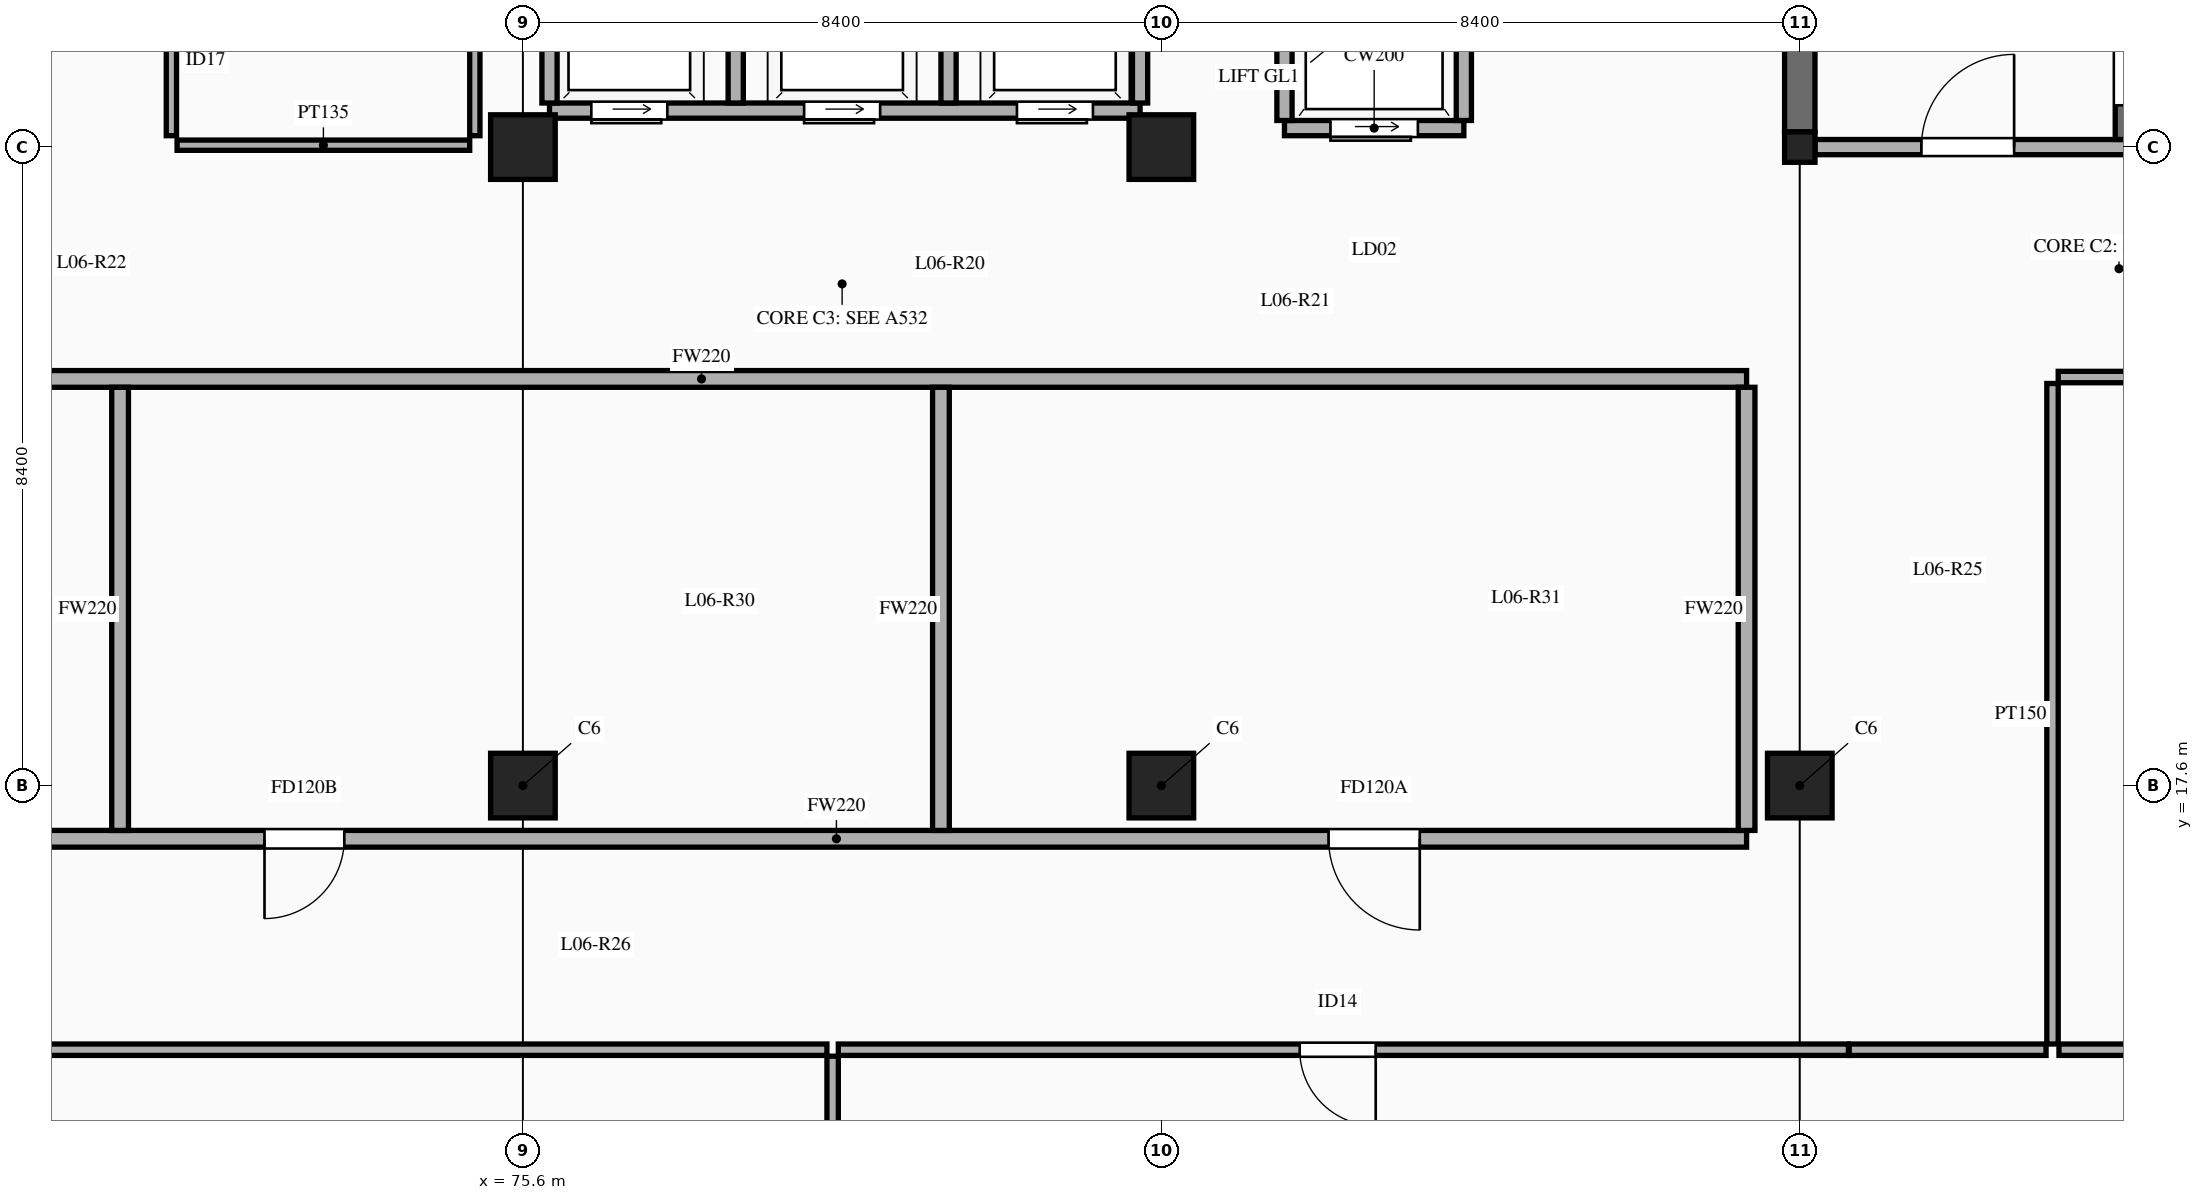
"""IFC4 building model, lengths in metres.
Left out: names, types, materials, properties, quantities, classifications, styles, units other than length and angle.
Written with IfcOpenShell. Run it as: python <this file> out.ifc"""

import sys

from ifc_helpers import new_model, si_unit, direction, frame, frame_2d, origin, origin_2d, place, context, subcontext, project, spatial, rectangle, extrude, element, fill, save


model = new_model("IFC4")
c1 = context("Model", 3, precision=1e-05, world=origin(), true_north=direction((0.0, 1.0)))
c2 = subcontext(c1, "Body", "Model", "MODEL_VIEW")
j1 = project(units=[si_unit("LENGTHUNIT", "METRE"), si_unit("PLANEANGLEUNIT", "RADIAN")], contexts=[c1])
p1 = place(None, origin())
s1 = spatial("IfcSite", under=j1, at=p1, CompositionType="ELEMENT")
p2 = place(p1, origin())
s2 = spatial("IfcBuilding", under=s1, at=p2, CompositionType="ELEMENT")
p3 = place(p2, frame((0.0, 0.0, 28.5)))
s3 = spatial("IfcBuildingStorey", under=s2, at=p3, CompositionType="ELEMENT", Elevation=28.5)
for number, where, z_axis, x_axis in (
    (1, (75.6, 17.6, 0.0), (0.0, 0.0, 1.0), (1.0, 0.0, 0.0)),
    (2, (75.6, 26.0, 0.0), (0.0, 0.0, 1.0), (1.0, 0.0, 0.0)),
    (3, (84.0, 17.6, 0.0), (0.0, 0.0, 1.0), (1.0, 0.0, 0.0)),
    (4, (84.0, 26.0, 0.0), (0.0, 0.0, 1.0), (1.0, 0.0, 0.0)),
    (5, (92.4, 17.6, 0.0), (0.0, 0.0, 1.0), (1.0, 0.0, 0.0)),
):
    element("IfcColumn", number, at=place(p3, frame(where, z_axis=z_axis, x_axis=x_axis)), inside=s3, PredefinedType="COLUMN", context=c2, shape_type="SweptSolid", body=[
        extrude(rectangle(XDim=0.85, YDim=0.85, at=origin_2d()), origin(), (0.0, 0.0, 1.0), 4.5),
    ])
p4 = place(p3, frame((92.4, 26.0, 0.0), z_axis=(0.0, 0.0, 1.0), x_axis=(1.0, 0.0, 0.0)))
e6 = element("IfcColumn", 6, at=p4, inside=s3, PredefinedType="COLUMN", context=c2, shape_type="SweptSolid", body=[
    extrude(rectangle(XDim=0.4, YDim=0.4, at=origin_2d()), origin(), (0.0, 0.0, 1.0), 4.5),
])
p5 = place(p3, frame((92.4, 26.2, 0.0), z_axis=(0.0, 0.0, 1.0), x_axis=(0.0, 1.0, 0.0)))
e7 = element("IfcWall", 7, at=p5, inside=s3, PredefinedType="SHEAR", context=c2, shape_type="SweptSolid", body=[
    extrude(rectangle(XDim=8.0, YDim=0.4, at=frame_2d((4.0, 0.0))), origin(), (0.0, 0.0, 1.0), 4.5),
])
p6 = place(p3, frame((92.6, 26.0, 0.0), z_axis=(0.0, 0.0, 1.0), x_axis=(1.0, 0.0, 0.0)))
e8 = element("IfcWall", 8, at=p6, inside=s3, PredefinedType="SOLIDWALL", context=c2, shape_type="SweptSolid", body=[
    extrude(rectangle(XDim=8.0, YDim=0.2, at=frame_2d((4.0, 0.0))), origin(), (0.0, 0.0, 1.0), 3.78),
])
p7 = place(p6, frame((1.4, 0.0, 0.0)))
e9 = element("IfcOpeningElement", 9, at=p7, cuts=e8, PredefinedType="OPENING", context=c2, shape_type="SweptSolid", body=[
    extrude(rectangle(XDim=1.22, YDim=2.15, at=frame_2d((0.61, 1.075))), frame((0.0, 0.11, 0.0), z_axis=(0.0, -1.0, 0.0), x_axis=(1.0, 0.0, 0.0)), (0.0, 0.0, 1.0), 0.22),
])
p8 = place(p6, frame((5.3, 0.0, 0.0)))
e10 = element("IfcOpeningElement", 10, at=p8, cuts=e8, PredefinedType="OPENING", context=c2, shape_type="SweptSolid", body=[
    extrude(rectangle(XDim=1.15, YDim=2.15, at=frame_2d((0.575, 1.075))), frame((0.0, 0.11, 0.0), z_axis=(0.0, -1.0, 0.0), x_axis=(1.0, 0.0, 0.0)), (0.0, 0.0, 1.0), 0.22),
])
p9 = place(p3, frame((96.65, 26.1, 0.0), z_axis=(0.0, 0.0, 1.0), x_axis=(0.0, 1.0, 0.0)))
e11 = element("IfcWall", 11, at=p9, inside=s3, PredefinedType="SOLIDWALL", context=c2, shape_type="SweptSolid", body=[
    extrude(rectangle(XDim=8.1, YDim=0.2, at=frame_2d((4.05, 0.0))), origin(), (0.0, 0.0, 1.0), 4.3),
])
p10 = place(p9, frame((0.45, 0.0, 0.0)))
e12 = element("IfcOpeningElement", 12, at=p10, cuts=e11, PredefinedType="OPENING", context=c2, shape_type="SweptSolid", body=[
    extrude(rectangle(XDim=1.12, YDim=2.15, at=frame_2d((0.56, 1.075))), frame((0.0, 0.11, 0.0), z_axis=(0.0, -1.0, 0.0), x_axis=(1.0, 0.0, 0.0)), (0.0, 0.0, 1.0), 0.22),
])
p11 = place(p3, frame((75.95, 26.48, 0.0), z_axis=(0.0, 0.0, 1.0), x_axis=(1.0, 0.0, 0.0)))
e13 = element("IfcWall", 13, at=p11, inside=s3, PredefinedType="SOLIDWALL", context=c2, shape_type="SweptSolid", body=[
    extrude(rectangle(XDim=7.77, YDim=0.2, at=frame_2d((3.885, 0.0))), origin(), (0.0, 0.0, 1.0), 4.3),
])
p12 = place(p11, frame((0.55, 0.0, 0.0)))
e14 = element("IfcOpeningElement", 14, at=p12, cuts=e13, PredefinedType="OPENING", context=c2, shape_type="SweptSolid", body=[
    extrude(rectangle(XDim=1.0, YDim=2.15, at=frame_2d((0.5, 1.075))), frame((0.0, 0.11, 0.0), z_axis=(0.0, -1.0, 0.0), x_axis=(1.0, 0.0, 0.0)), (0.0, 0.0, 1.0), 0.22),
])
p13 = place(p11, frame((3.35, 0.0, 0.0)))
e15 = element("IfcOpeningElement", 15, at=p13, cuts=e13, PredefinedType="OPENING", context=c2, shape_type="SweptSolid", body=[
    extrude(rectangle(XDim=1.0, YDim=2.15, at=frame_2d((0.5, 1.075))), frame((0.0, 0.11, 0.0), z_axis=(0.0, -1.0, 0.0), x_axis=(1.0, 0.0, 0.0)), (0.0, 0.0, 1.0), 0.22),
])
p14 = place(p11, frame((6.15, 0.0, 0.0)))
e16 = element("IfcOpeningElement", 16, at=p14, cuts=e13, PredefinedType="OPENING", context=c2, shape_type="SweptSolid", body=[
    extrude(rectangle(XDim=1.0, YDim=2.15, at=frame_2d((0.5, 1.075))), frame((0.0, 0.11, 0.0), z_axis=(0.0, -1.0, 0.0), x_axis=(1.0, 0.0, 0.0)), (0.0, 0.0, 1.0), 0.22),
])
p15 = place(p3, frame((75.95, 26.58, 0.0), z_axis=(0.0, 0.0, 1.0), x_axis=(0.0, 1.0, 0.0)))
e17 = element("IfcWall", 17, at=p15, inside=s3, PredefinedType="SOLIDWALL", context=c2, shape_type="SweptSolid", body=[
    extrude(rectangle(XDim=1.84, YDim=0.2, at=frame_2d((0.92, 0.0))), origin(), (0.0, 0.0, 1.0), 3.88),
])
for number, where, z_axis, x_axis in (
    (18, (78.4, 26.58, 0.0), (0.0, 0.0, 1.0), (0.0, 1.0, 0.0)),
    (19, (81.2, 26.58, 0.0), (0.0, 0.0, 1.0), (0.0, 1.0, 0.0)),
):
    element("IfcWall", number, at=place(p3, frame(where, z_axis=z_axis, x_axis=x_axis)), inside=s3, PredefinedType="SOLIDWALL", context=c2, shape_type="SweptSolid", body=[
        extrude(rectangle(XDim=1.84, YDim=0.2, at=frame_2d((0.92, 0.0))), origin(), (0.0, 0.0, 1.0), 4.3),
    ])
p16 = place(p3, frame((83.72, 26.58, 0.0), z_axis=(0.0, 0.0, 1.0), x_axis=(0.0, 1.0, 0.0)))
e20 = element("IfcWall", 20, at=p16, inside=s3, PredefinedType="SOLIDWALL", context=c2, shape_type="SweptSolid", body=[
    extrude(rectangle(XDim=1.84, YDim=0.2, at=frame_2d((0.92, 0.0))), origin(), (0.0, 0.0, 1.0), 3.88),
])
p17 = place(p3, frame((85.62, 26.25, 0.0), z_axis=(0.0, 0.0, 1.0), x_axis=(1.0, 0.0, 0.0)))
e21 = element("IfcWall", 21, at=p17, inside=s3, PredefinedType="SOLIDWALL", context=c2, shape_type="SweptSolid", body=[
    extrude(rectangle(XDim=2.36, YDim=0.2, at=frame_2d((1.18, 0.0))), origin(), (0.0, 0.0, 1.0), 3.78),
])
p18 = place(p17, frame((0.605, 0.0, 0.0)))
e22 = element("IfcOpeningElement", 22, at=p18, cuts=e21, PredefinedType="OPENING", context=c2, shape_type="SweptSolid", body=[
    extrude(rectangle(XDim=1.15, YDim=2.2, at=frame_2d((0.575, 1.1))), frame((0.0, 0.11, 0.0), z_axis=(0.0, -1.0, 0.0), x_axis=(1.0, 0.0, 0.0)), (0.0, 0.0, 1.0), 0.22),
])
p19 = place(p3, frame((85.62, 26.35, 0.0), z_axis=(0.0, 0.0, 1.0), x_axis=(0.0, 1.0, 0.0)))
e23 = element("IfcWall", 23, at=p19, inside=s3, PredefinedType="SOLIDWALL", context=c2, shape_type="SweptSolid", body=[
    extrude(rectangle(XDim=2.9, YDim=0.2, at=frame_2d((1.45, 0.0))), origin(), (0.0, 0.0, 1.0), 4.3),
])
p20 = place(p3, frame((87.98, 26.35, 0.0), z_axis=(0.0, 0.0, 1.0), x_axis=(0.0, 1.0, 0.0)))
e24 = element("IfcWall", 24, at=p20, inside=s3, PredefinedType="SOLIDWALL", context=c2, shape_type="SweptSolid", body=[
    extrude(rectangle(XDim=2.9, YDim=0.2, at=frame_2d((1.45, 0.0))), origin(), (0.0, 0.0, 1.0), 3.98),
])
p21 = place(p3, frame((59.5, 22.95, 0.0), z_axis=(0.0, 0.0, 1.0), x_axis=(1.0, 0.0, 0.0)))
e25 = element("IfcWall", 25, at=p21, inside=s3, PredefinedType="SOLIDWALL", context=c2, shape_type="SweptSolid", body=[
    extrude(rectangle(XDim=32.2, YDim=0.22, at=frame_2d((16.1, 0.0))), origin(), (0.0, 0.0, 1.0), 3.45),
])
p22 = place(p21, frame((3.0, 0.0, 0.0)))
e26 = element("IfcOpeningElement", 26, at=p22, cuts=e25, PredefinedType="OPENING", context=c2, shape_type="SweptSolid", body=[
    extrude(rectangle(XDim=1.2, YDim=2.2, at=frame_2d((0.6, 1.1))), frame((0.0, 0.12, 0.0), z_axis=(0.0, -1.0, 0.0), x_axis=(1.0, 0.0, 0.0)), (0.0, 0.0, 1.0), 0.24),
])
p23 = place(p3, frame((59.5, 16.9, 0.0), z_axis=(0.0, 0.0, 1.0), x_axis=(1.0, 0.0, 0.0)))
e27 = element("IfcWall", 27, at=p23, inside=s3, PredefinedType="SOLIDWALL", context=c2, shape_type="SweptSolid", body=[
    extrude(rectangle(XDim=32.2, YDim=0.22, at=frame_2d((16.1, 0.0))), origin(), (0.0, 0.0, 1.0), 3.45),
])
p24 = place(p23, frame((12.7, 0.0, 0.0)))
e28 = element("IfcOpeningElement", 28, at=p24, cuts=e27, PredefinedType="OPENING", context=c2, shape_type="SweptSolid", body=[
    extrude(rectangle(XDim=1.05, YDim=2.15, at=frame_2d((0.525, 1.075))), frame((0.0, 0.12, 0.0), z_axis=(0.0, -1.0, 0.0), x_axis=(1.0, 0.0, 0.0)), (0.0, 0.0, 1.0), 0.24),
])
p25 = place(p23, frame((26.7, 0.0, 0.0)))
e29 = element("IfcOpeningElement", 29, at=p25, cuts=e27, PredefinedType="OPENING", context=c2, shape_type="SweptSolid", body=[
    extrude(rectangle(XDim=1.2, YDim=2.2, at=frame_2d((0.6, 1.1))), frame((0.0, 0.12, 0.0), z_axis=(0.0, -1.0, 0.0), x_axis=(1.0, 0.0, 0.0)), (0.0, 0.0, 1.0), 0.24),
])
for number, where, z_axis, x_axis in (
    (30, (91.7, 17.01, 0.0), (0.0, 0.0, 1.0), (0.0, 1.0, 0.0)),
    (31, (70.3, 17.01, 0.0), (0.0, 0.0, 1.0), (0.0, 1.0, 0.0)),
    (32, (81.1, 17.01, 0.0), (0.0, 0.0, 1.0), (0.0, 1.0, 0.0)),
):
    element("IfcWall", number, at=place(p3, frame(where, z_axis=z_axis, x_axis=x_axis)), inside=s3, PredefinedType="SOLIDWALL", context=c2, shape_type="SweptSolid", body=[
        extrude(rectangle(XDim=5.83, YDim=0.22, at=frame_2d((2.915, 0.0))), origin(), (0.0, 0.0, 1.0), 3.45),
    ])
p26 = place(p3, frame((70.975, 26.15, 0.0), z_axis=(0.0, 0.0, 1.0), x_axis=(0.0, 1.0, 0.0)))
e33 = element("IfcWall", 33, at=p26, inside=s3, PredefinedType="PARTITIONING", context=c2, shape_type="SweptSolid", body=[
    extrude(rectangle(XDim=3.95, YDim=0.135, at=frame_2d((1.975, 0.0))), origin(), (0.0, 0.0, 1.0), 3.45),
])
p27 = place(p26, frame((1.441, 0.0, 0.0)))
e34 = element("IfcOpeningElement", 34, at=p27, cuts=e33, PredefinedType="OPENING", context=c2, shape_type="SweptSolid", body=[
    extrude(rectangle(XDim=0.92, YDim=2.12, at=frame_2d((0.46, 1.06))), frame((0.0, 0.077, 0.0), z_axis=(0.0, -1.0, 0.0), x_axis=(1.0, 0.0, 0.0)), (0.0, 0.0, 1.0), 0.155),
])
p28 = place(p3, frame((71.05, 26.025, 0.0), z_axis=(0.0, 0.0, 1.0), x_axis=(1.0, 0.0, 0.0)))
e35 = element("IfcWall", 35, at=p28, inside=s3, PredefinedType="PARTITIONING", context=c2, shape_type="SweptSolid", body=[
    extrude(rectangle(XDim=3.85, YDim=0.135, at=frame_2d((1.925, 0.0))), origin(), (0.0, 0.0, 1.0), 3.45),
])
p29 = place(p3, frame((95.8, 22.975, 0.0), z_axis=(0.0, 0.0, 1.0), x_axis=(1.0, 0.0, 0.0)))
e36 = element("IfcWall", 36, at=p29, inside=s3, PredefinedType="PARTITIONING", context=c2, shape_type="SweptSolid", body=[
    extrude(rectangle(XDim=12.95, YDim=0.15, at=frame_2d((6.475, 0.0))), origin(), (0.0, 0.0, 1.0), 3.45),
])
p30 = place(p29, frame((6.255, 0.0, 0.0)))
e37 = element("IfcOpeningElement", 37, at=p30, cuts=e36, PredefinedType="OPENING", context=c2, shape_type="SweptSolid", body=[
    extrude(rectangle(XDim=1.04, YDim=2.15, at=frame_2d((0.52, 1.075))), frame((0.0, 0.085, 0.0), z_axis=(0.0, -1.0, 0.0), x_axis=(1.0, 0.0, 0.0)), (0.0, 0.0, 1.0), 0.17),
])
p31 = place(p3, frame((95.725, 14.2, 0.0), z_axis=(0.0, 0.0, 1.0), x_axis=(0.0, 1.0, 0.0)))
e38 = element("IfcWall", 38, at=p31, inside=s3, PredefinedType="PARTITIONING", context=c2, shape_type="SweptSolid", body=[
    extrude(rectangle(XDim=8.69, YDim=0.15, at=frame_2d((4.345, 0.0))), origin(), (0.0, 0.0, 1.0), 3.45),
])
p32 = place(p3, frame((93.05, 14.125, 0.0), z_axis=(0.0, 0.0, 1.0), x_axis=(1.0, 0.0, 0.0)))
e39 = element("IfcWall", 39, at=p32, inside=s3, PredefinedType="PARTITIONING", context=c2, shape_type="SweptSolid", body=[
    extrude(rectangle(XDim=2.59, YDim=0.15, at=frame_2d((1.295, 0.0))), origin(), (0.0, 0.0, 1.0), 3.45),
])
p33 = place(p3, frame((58.16, 14.125, 0.0), z_axis=(0.0, 0.0, 1.0), x_axis=(1.0, 0.0, 0.0)))
e40 = element("IfcWall", 40, at=p33, inside=s3, PredefinedType="PARTITIONING", context=c2, shape_type="SweptSolid", body=[
    extrude(rectangle(XDim=21.44, YDim=0.15, at=frame_2d((10.72, 0.0))), origin(), (0.0, 0.0, 1.0), 3.45),
])
p34 = place(p33, frame((10.145, 0.0, 0.0)))
e41 = element("IfcOpeningElement", 41, at=p34, cuts=e40, PredefinedType="OPENING", context=c2, shape_type="SweptSolid", body=[
    extrude(rectangle(XDim=1.0, YDim=2.15, at=frame_2d((0.5, 1.075))), frame((0.0, 0.085, 0.0), z_axis=(0.0, -1.0, 0.0), x_axis=(1.0, 0.0, 0.0)), (0.0, 0.0, 1.0), 0.17),
])
p35 = place(p3, frame((79.75, 14.125, 0.0), z_axis=(0.0, 0.0, 1.0), x_axis=(1.0, 0.0, 0.0)))
e42 = element("IfcWall", 42, at=p35, inside=s3, PredefinedType="PARTITIONING", context=c2, shape_type="SweptSolid", body=[
    extrude(rectangle(XDim=13.29, YDim=0.15, at=frame_2d((6.645, 0.0))), origin(), (0.0, 0.0, 1.0), 3.45),
])
p36 = place(p35, frame((6.07, 0.0, 0.0)))
e43 = element("IfcOpeningElement", 43, at=p36, cuts=e42, PredefinedType="OPENING", context=c2, shape_type="SweptSolid", body=[
    extrude(rectangle(XDim=1.0, YDim=2.15, at=frame_2d((0.5, 1.075))), frame((0.0, 0.085, 0.0), z_axis=(0.0, -1.0, 0.0), x_axis=(1.0, 0.0, 0.0)), (0.0, 0.0, 1.0), 0.17),
])
p37 = place(p3, frame((95.81, 14.125, 0.0), z_axis=(0.0, 0.0, 1.0), x_axis=(1.0, 0.0, 0.0)))
e44 = element("IfcWall", 44, at=p37, inside=s3, PredefinedType="PARTITIONING", context=c2, shape_type="SweptSolid", body=[
    extrude(rectangle(XDim=12.94, YDim=0.15, at=frame_2d((6.47, 0.0))), origin(), (0.0, 0.0, 1.0), 3.45),
])
p38 = place(p3, frame((79.675, 9.65, 0.0), z_axis=(0.0, 0.0, 1.0), x_axis=(0.0, 1.0, 0.0)))
e45 = element("IfcWall", 45, at=p38, inside=s3, PredefinedType="PARTITIONING", context=c2, shape_type="SweptSolid", body=[
    extrude(rectangle(XDim=4.39, YDim=0.15, at=frame_2d((2.195, 0.0))), origin(), (0.0, 0.0, 1.0), 3.45),
])
p39 = place(p3, frame((74.968, 26.15, 0.0), z_axis=(0.0, 0.0, 1.0), x_axis=(0.0, 1.0, 0.0)))
e46 = element("IfcWall", 46, at=p39, inside=s3, PredefinedType="PARTITIONING", context=c2, shape_type="SweptSolid", body=[
    extrude(rectangle(XDim=3.948, YDim=0.135, at=frame_2d((1.974, 0.0))), origin(), (0.0, 0.0, 1.0), 3.45),
])
p40 = place(p7, origin())
e47 = element("IfcDoor", 47, at=p40, inside=s3, OperationType="SINGLE_SWING_RIGHT", PredefinedType="DOOR", context=c2, shape_type="SweptSolid", body=[
    extrude(rectangle(XDim=1.22, YDim=2.15, at=frame_2d((0.61, 1.075))), frame((0.0, 0.025, 0.0), z_axis=(0.0, -1.0, 0.0), x_axis=(1.0, 0.0, 0.0)), (0.0, 0.0, 1.0), 0.05),
])
fill(e9, e47)
p41 = place(p10, frame((1.12, 0.0, 0.0), z_axis=(0.0, 0.0, 1.0), x_axis=(-1.0, 0.0, 0.0)))
e48 = element("IfcDoor", 48, at=p41, inside=s3, OperationType="SINGLE_SWING_RIGHT", PredefinedType="DOOR", context=c2, shape_type="SweptSolid", body=[
    extrude(rectangle(XDim=1.12, YDim=2.15, at=frame_2d((0.56, 1.075))), frame((0.0, 0.025, 0.0), z_axis=(0.0, -1.0, 0.0), x_axis=(1.0, 0.0, 0.0)), (0.0, 0.0, 1.0), 0.05),
])
fill(e12, e48)
p42 = place(p12, frame((1.0, 0.0, 0.0), z_axis=(0.0, 0.0, 1.0), x_axis=(-1.0, 0.0, 0.0)))
e49 = element("IfcDoor", 49, at=p42, inside=s3, OperationType="SLIDING_TO_LEFT", PredefinedType="DOOR", context=c2, shape_type="SweptSolid", body=[
    extrude(rectangle(XDim=1.0, YDim=2.15, at=frame_2d((0.5, 1.075))), frame((0.0, 0.025, 0.0), z_axis=(0.0, -1.0, 0.0), x_axis=(1.0, 0.0, 0.0)), (0.0, 0.0, 1.0), 0.05),
])
fill(e14, e49)
p43 = place(p13, frame((1.0, 0.0, 0.0), z_axis=(0.0, 0.0, 1.0), x_axis=(-1.0, 0.0, 0.0)))
e50 = element("IfcDoor", 50, at=p43, inside=s3, OperationType="SLIDING_TO_LEFT", PredefinedType="DOOR", context=c2, shape_type="SweptSolid", body=[
    extrude(rectangle(XDim=1.0, YDim=2.15, at=frame_2d((0.5, 1.075))), frame((0.0, 0.025, 0.0), z_axis=(0.0, -1.0, 0.0), x_axis=(1.0, 0.0, 0.0)), (0.0, 0.0, 1.0), 0.05),
])
fill(e15, e50)
p44 = place(p14, frame((1.0, 0.0, 0.0), z_axis=(0.0, 0.0, 1.0), x_axis=(-1.0, 0.0, 0.0)))
e51 = element("IfcDoor", 51, at=p44, inside=s3, OperationType="SLIDING_TO_LEFT", PredefinedType="DOOR", context=c2, shape_type="SweptSolid", body=[
    extrude(rectangle(XDim=1.0, YDim=2.15, at=frame_2d((0.5, 1.075))), frame((0.0, 0.025, 0.0), z_axis=(0.0, -1.0, 0.0), x_axis=(1.0, 0.0, 0.0)), (0.0, 0.0, 1.0), 0.05),
])
fill(e16, e51)
p45 = place(p18, frame((1.15, 0.0, 0.0), z_axis=(0.0, 0.0, 1.0), x_axis=(-1.0, 0.0, 0.0)))
e52 = element("IfcDoor", 52, at=p45, inside=s3, OperationType="SLIDING_TO_LEFT", PredefinedType="DOOR", context=c2, shape_type="SweptSolid", body=[
    extrude(rectangle(XDim=1.15, YDim=2.2, at=frame_2d((0.575, 1.1))), frame((0.0, 0.025, 0.0), z_axis=(0.0, -1.0, 0.0), x_axis=(1.0, 0.0, 0.0)), (0.0, 0.0, 1.0), 0.05),
])
fill(e22, e52)
p46 = place(p24, frame((1.05, 0.0, 0.0), z_axis=(0.0, 0.0, 1.0), x_axis=(-1.0, 0.0, 0.0)))
e53 = element("IfcDoor", 53, at=p46, inside=s3, OperationType="SINGLE_SWING_RIGHT", PredefinedType="DOOR", context=c2, shape_type="SweptSolid", body=[
    extrude(rectangle(XDim=1.05, YDim=2.15, at=frame_2d((0.525, 1.075))), frame((0.0, 0.025, 0.0), z_axis=(0.0, -1.0, 0.0), x_axis=(1.0, 0.0, 0.0)), (0.0, 0.0, 1.0), 0.05),
])
fill(e28, e53)
p47 = place(p25, frame((1.2, 0.0, 0.0), z_axis=(0.0, 0.0, 1.0), x_axis=(-1.0, 0.0, 0.0)))
e54 = element("IfcDoor", 54, at=p47, inside=s3, OperationType="SINGLE_SWING_LEFT", PredefinedType="DOOR", context=c2, shape_type="SweptSolid", body=[
    extrude(rectangle(XDim=1.2, YDim=2.2, at=frame_2d((0.6, 1.1))), frame((0.0, 0.025, 0.0), z_axis=(0.0, -1.0, 0.0), x_axis=(1.0, 0.0, 0.0)), (0.0, 0.0, 1.0), 0.05),
])
fill(e29, e54)
p48 = place(p36, frame((1.0, 0.0, 0.0), z_axis=(0.0, 0.0, 1.0), x_axis=(-1.0, 0.0, 0.0)))
e55 = element("IfcDoor", 55, at=p48, inside=s3, OperationType="SINGLE_SWING_LEFT", PredefinedType="DOOR", context=c2, shape_type="SweptSolid", body=[
    extrude(rectangle(XDim=1.0, YDim=2.15, at=frame_2d((0.5, 1.075))), frame((0.0, 0.025, 0.0), z_axis=(0.0, -1.0, 0.0), x_axis=(1.0, 0.0, 0.0)), (0.0, 0.0, 1.0), 0.05),
])
fill(e43, e55)
save(model, sys.argv[1])
